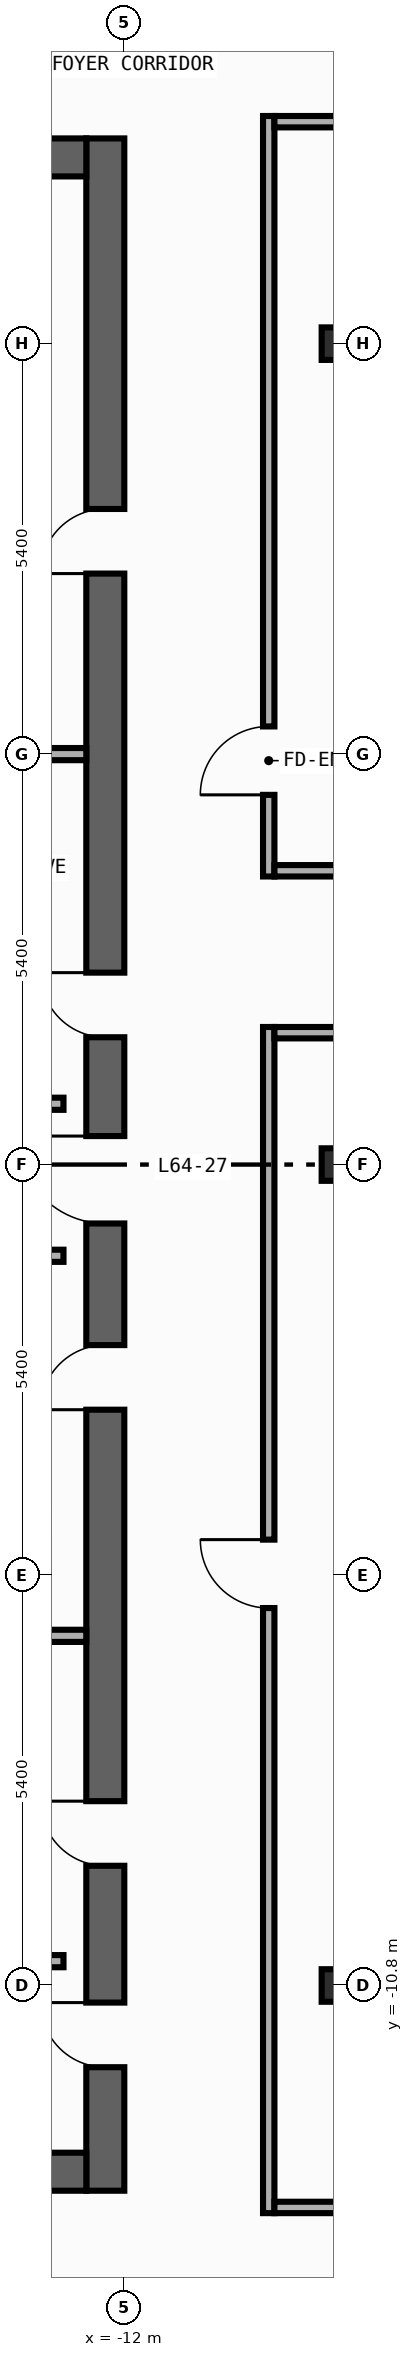
"""IFC4 building model, lengths in metres.
Left out: names, types, materials, properties, quantities, classifications, styles, units other than length and angle.
Written with IfcOpenShell. Run it as: python <this file> out.ifc"""

import sys

from ifc_helpers import new_model, si_unit, direction, frame, frame_2d, origin, origin_2d, place, context, subcontext, project, spatial, rectangle, i_section, extrude, element, fill, save


model = new_model("IFC4")
c1 = context("Model", 3, precision=1e-05, world=origin(), true_north=direction((0.0, 1.0)))
c2 = subcontext(c1, "Body", "Model", "MODEL_VIEW")
j1 = project(units=[si_unit("LENGTHUNIT", "METRE"), si_unit("PLANEANGLEUNIT", "RADIAN")], contexts=[c1])
p1 = place(None, origin())
s1 = spatial("IfcSite", under=j1, at=p1, CompositionType="ELEMENT")
p2 = place(p1, origin())
s2 = spatial("IfcBuilding", under=s1, at=p2, CompositionType="ELEMENT")
p3 = place(p2, frame((0.0, 0.0, 269.2)))
s3 = spatial("IfcBuildingStorey", under=s2, at=p3, CompositionType="ELEMENT", Elevation=269.2)
p4 = place(p3, frame((-12.25, -13.5, 0.0), z_axis=(0.0, 0.0, 1.0), x_axis=(0.0, 1.0, 0.0)))
e1 = element("IfcWall", 1, at=p4, inside=s3, PredefinedType="SHEAR", context=c2, shape_type="SweptSolid", body=[
    extrude(rectangle(XDim=27.0, YDim=0.5, at=frame_2d((13.5, 0.0))), origin(), (0.0, 0.0, 1.0), 3.25),
])
p5 = place(p4, frame((15.175, 0.0, 0.0)))
e2 = element("IfcOpeningElement", 2, at=p5, cuts=e1, PredefinedType="OPENING", context=c2, shape_type="SweptSolid", body=[
    extrude(rectangle(XDim=0.85, YDim=2.1, at=frame_2d((0.425, 1.05))), frame((0.0, 0.26, 0.0), z_axis=(0.0, -1.0, 0.0), x_axis=(1.0, 0.0, 0.0)), (0.0, 0.0, 1.0), 0.52),
])
p6 = place(p4, frame((21.275, 0.0, 0.0)))
e3 = element("IfcOpeningElement", 3, at=p6, cuts=e1, PredefinedType="OPENING", context=c2, shape_type="SweptSolid", body=[
    extrude(rectangle(XDim=0.85, YDim=2.1, at=frame_2d((0.425, 1.05))), frame((0.0, 0.26, 0.0), z_axis=(0.0, -1.0, 0.0), x_axis=(1.0, 0.0, 0.0)), (0.0, 0.0, 1.0), 0.52),
])
p7 = place(p4, frame((4.275, 0.0, 0.0)))
e4 = element("IfcOpeningElement", 4, at=p7, cuts=e1, PredefinedType="OPENING", context=c2, shape_type="SweptSolid", body=[
    extrude(rectangle(XDim=0.85, YDim=2.1, at=frame_2d((0.425, 1.05))), frame((0.0, 0.26, 0.0), z_axis=(0.0, -1.0, 0.0), x_axis=(1.0, 0.0, 0.0)), (0.0, 0.0, 1.0), 0.52),
])
p8 = place(p4, frame((10.275, 0.0, 0.0)))
e5 = element("IfcOpeningElement", 5, at=p8, cuts=e1, PredefinedType="OPENING", context=c2, shape_type="SweptSolid", body=[
    extrude(rectangle(XDim=0.85, YDim=2.1, at=frame_2d((0.425, 1.05))), frame((0.0, 0.26, 0.0), z_axis=(0.0, -1.0, 0.0), x_axis=(1.0, 0.0, 0.0)), (0.0, 0.0, 1.0), 0.52),
])
p9 = place(p4, frame((12.725, 0.0, 0.0)))
e6 = element("IfcOpeningElement", 6, at=p9, cuts=e1, PredefinedType="OPENING", context=c2, shape_type="SweptSolid", body=[
    extrude(rectangle(XDim=1.15, YDim=2.2, at=frame_2d((0.575, 1.1))), frame((0.0, 0.26, 0.0), z_axis=(0.0, -1.0, 0.0), x_axis=(1.0, 0.0, 0.0)), (0.0, 0.0, 1.0), 0.52),
])
p10 = place(p4, frame((1.625, 0.0, 0.0)))
e7 = element("IfcOpeningElement", 7, at=p10, cuts=e1, PredefinedType="OPENING", context=c2, shape_type="SweptSolid", body=[
    extrude(rectangle(XDim=0.85, YDim=2.1, at=frame_2d((0.425, 1.05))), frame((0.0, 0.26, 0.0), z_axis=(0.0, -1.0, 0.0), x_axis=(1.0, 0.0, 0.0)), (0.0, 0.0, 1.0), 0.52),
])
for number, where, z_axis, x_axis in (
    (8, (-19.9, -13.25, 0.0), (0.0, 0.0, 1.0), (1.0, 0.0, 0.0)),
    (9, (-19.9, 13.25, 0.0), (0.0, 0.0, 1.0), (1.0, 0.0, 0.0)),
):
    element("IfcWall", number, at=place(p3, frame(where, z_axis=z_axis, x_axis=x_axis)), inside=s3, PredefinedType="SHEAR", context=c2, shape_type="SweptSolid", body=[
        extrude(rectangle(XDim=7.4, YDim=0.5, at=frame_2d((3.7, 0.0))), origin(), (0.0, 0.0, 1.0), 3.25),
    ])
for number, where, z_axis, x_axis in (
    (10, (-9.2, -10.8, 0.0), (0.0, 0.0, 1.0), (1.0, 0.0, 0.0)),
    (11, (-9.2, 0.0, 0.0), (0.0, 0.0, 1.0), (1.0, 0.0, 0.0)),
    (12, (-9.2, 10.8, 0.0), (0.0, 0.0, 1.0), (1.0, 0.0, 0.0)),
):
    element("IfcColumn", number, at=place(p3, frame(where, z_axis=z_axis, x_axis=x_axis)), inside=s3, PredefinedType="COLUMN", context=c2, shape_type="SweptSolid", body=[
        extrude(i_section(OverallWidth=0.407, OverallDepth=0.428, WebThickness=0.02, FlangeThickness=0.035, FilletRadius=0.022, at=origin_2d()), origin(), (0.0, 0.0, 1.0), 3.6),
    ])
for number, where, z_axis, x_axis in (
    (13, (-15.4, 0.8, 0.0), (0.0, 0.0, 1.0), (1.0, 0.0, 0.0)),
    (14, (-15.4, -1.2, 0.0), (0.0, 0.0, 1.0), (1.0, 0.0, 0.0)),
    (15, (-15.4, -10.48, 0.0), (0.0, 0.0, 1.0), (1.0, 0.0, 0.0)),
):
    element("IfcWall", number, at=place(p3, frame(where, z_axis=z_axis, x_axis=x_axis)), inside=s3, PredefinedType="STANDARD", context=c2, shape_type="SweptSolid", body=[
        extrude(rectangle(XDim=2.6, YDim=0.16, at=frame_2d((1.3, 0.0))), origin(), (0.0, 0.0, 1.0), 3.25),
    ])
for number, where, z_axis, x_axis in (
    (16, (-15.4, 5.4, 0.0), (0.0, 0.0, 1.0), (1.0, 0.0, 0.0)),
    (17, (-15.4, -6.2, 0.0), (0.0, 0.0, 1.0), (1.0, 0.0, 0.0)),
):
    element("IfcWall", number, at=place(p3, frame(where, z_axis=z_axis, x_axis=x_axis)), inside=s3, PredefinedType="PARTITIONING", context=c2, shape_type="SweptSolid", body=[
        extrude(rectangle(XDim=2.9, YDim=0.16, at=frame_2d((1.45, 0.0))), origin(), (0.0, 0.0, 1.0), 3.25),
    ])
p11 = place(p3, frame((-10.1, 3.79, 0.0), z_axis=(0.0, 0.0, 1.0), x_axis=(0.0, 1.0, 0.0)))
e18 = element("IfcWall", 18, at=p11, inside=s3, PredefinedType="PARTITIONING", context=c2, shape_type="SweptSolid", body=[
    extrude(rectangle(XDim=10.005, YDim=0.15, at=frame_2d((5.002, 0.0))), origin(), (0.0, 0.0, 1.0), 3.25),
])
p12 = place(p11, frame((1.074, 0.0, 0.0)))
e19 = element("IfcOpeningElement", 19, at=p12, cuts=e18, PredefinedType="OPENING", context=c2, shape_type="SweptSolid", body=[
    extrude(rectangle(XDim=0.9, YDim=2.15, at=frame_2d((0.45, 1.075))), frame((0.0, 0.085, 0.0), z_axis=(0.0, -1.0, 0.0), x_axis=(1.0, 0.0, 0.0)), (0.0, 0.0, 1.0), 0.17),
])
p13 = place(p3, frame((-10.1, -13.795, 0.0), z_axis=(0.0, 0.0, 1.0), x_axis=(0.0, 1.0, 0.0)))
e20 = element("IfcWall", 20, at=p13, inside=s3, PredefinedType="PARTITIONING", context=c2, shape_type="SweptSolid", body=[
    extrude(rectangle(XDim=15.605, YDim=0.15, at=frame_2d((7.802, 0.0))), origin(), (0.0, 0.0, 1.0), 3.25),
])
p14 = place(p13, frame((7.961, 0.0, 0.0)))
e21 = element("IfcOpeningElement", 21, at=p14, cuts=e20, PredefinedType="OPENING", context=c2, shape_type="SweptSolid", body=[
    extrude(rectangle(XDim=0.9, YDim=2.15, at=frame_2d((0.45, 1.075))), frame((0.0, 0.085, 0.0), z_axis=(0.0, -1.0, 0.0), x_axis=(1.0, 0.0, 0.0)), (0.0, 0.0, 1.0), 0.17),
])
p15 = place(p3, frame((-10.025, 3.865, 0.0), z_axis=(0.0, 0.0, 1.0), x_axis=(1.0, 0.0, 0.0)))
e22 = element("IfcWall", 22, at=p15, inside=s3, PredefinedType="PARTITIONING", context=c2, shape_type="SweptSolid", body=[
    extrude(rectangle(XDim=12.055, YDim=0.15, at=frame_2d((6.027, 0.0))), origin(), (0.0, 0.0, 1.0), 3.25),
])
p16 = place(p15, frame((9.491, 0.0, 0.0)))
e23 = element("IfcOpeningElement", 23, at=p16, cuts=e22, PredefinedType="OPENING", context=c2, shape_type="SweptSolid", body=[
    extrude(rectangle(XDim=0.9, YDim=2.15, at=frame_2d((0.45, 1.075))), frame((0.0, 0.085, 0.0), z_axis=(0.0, -1.0, 0.0), x_axis=(1.0, 0.0, 0.0)), (0.0, 0.0, 1.0), 0.17),
])
p17 = place(p3, frame((-10.025, 1.735, 0.0), z_axis=(0.0, 0.0, 1.0), x_axis=(1.0, 0.0, 0.0)))
e24 = element("IfcWall", 24, at=p17, inside=s3, PredefinedType="PARTITIONING", context=c2, shape_type="SweptSolid", body=[
    extrude(rectangle(XDim=12.035, YDim=0.15, at=frame_2d((6.018, 0.0))), origin(), (0.0, 0.0, 1.0), 3.25),
])
p18 = place(p17, frame((9.674, 0.0, 0.0)))
e25 = element("IfcOpeningElement", 25, at=p18, cuts=e24, PredefinedType="OPENING", context=c2, shape_type="SweptSolid", body=[
    extrude(rectangle(XDim=0.9, YDim=2.15, at=frame_2d((0.45, 1.075))), frame((0.0, 0.085, 0.0), z_axis=(0.0, -1.0, 0.0), x_axis=(1.0, 0.0, 0.0)), (0.0, 0.0, 1.0), 0.17),
])
p19 = place(p3, frame((-10.025, 13.72, 0.0), z_axis=(0.0, 0.0, 1.0), x_axis=(1.0, 0.0, 0.0)))
e26 = element("IfcWall", 26, at=p19, inside=s3, PredefinedType="PARTITIONING", context=c2, shape_type="SweptSolid", body=[
    extrude(rectangle(XDim=12.055, YDim=0.15, at=frame_2d((6.027, 0.0))), origin(), (0.0, 0.0, 1.0), 3.25),
])
p20 = place(p19, frame((7.283, 0.0, 0.0)))
e27 = element("IfcOpeningElement", 27, at=p20, cuts=e26, PredefinedType="OPENING", context=c2, shape_type="SweptSolid", body=[
    extrude(rectangle(XDim=0.9, YDim=2.15, at=frame_2d((0.45, 1.075))), frame((0.0, 0.085, 0.0), z_axis=(0.0, -1.0, 0.0), x_axis=(1.0, 0.0, 0.0)), (0.0, 0.0, 1.0), 0.17),
])
p21 = place(p3, frame((-10.025, -13.72, 0.0), z_axis=(0.0, 0.0, 1.0), x_axis=(1.0, 0.0, 0.0)))
e28 = element("IfcWall", 28, at=p21, inside=s3, PredefinedType="PARTITIONING", context=c2, shape_type="SweptSolid", body=[
    extrude(rectangle(XDim=11.885, YDim=0.15, at=frame_2d((5.942, 0.0))), origin(), (0.0, 0.0, 1.0), 3.25),
])
p22 = place(p21, frame((7.304, 0.0, 0.0)))
e29 = element("IfcOpeningElement", 29, at=p22, cuts=e28, PredefinedType="OPENING", context=c2, shape_type="SweptSolid", body=[
    extrude(rectangle(XDim=0.9, YDim=2.15, at=frame_2d((0.45, 1.075))), frame((0.0, 0.085, 0.0), z_axis=(0.0, -1.0, 0.0), x_axis=(1.0, 0.0, 0.0)), (0.0, 0.0, 1.0), 0.17),
])
p23 = place(p5, origin())
e30 = element("IfcDoor", 30, at=p23, inside=s3, OperationType="SINGLE_SWING_RIGHT", PredefinedType="DOOR", context=c2, shape_type="SweptSolid", body=[
    extrude(rectangle(XDim=0.85, YDim=2.1, at=frame_2d((0.425, 1.05))), frame((0.0, 0.025, 0.0), z_axis=(0.0, -1.0, 0.0), x_axis=(1.0, 0.0, 0.0)), (0.0, 0.0, 1.0), 0.05),
])
fill(e2, e30)
p24 = place(p6, origin())
e31 = element("IfcDoor", 31, at=p24, inside=s3, OperationType="SINGLE_SWING_LEFT", PredefinedType="DOOR", context=c2, shape_type="SweptSolid", body=[
    extrude(rectangle(XDim=0.85, YDim=2.1, at=frame_2d((0.425, 1.05))), frame((0.0, 0.025, 0.0), z_axis=(0.0, -1.0, 0.0), x_axis=(1.0, 0.0, 0.0)), (0.0, 0.0, 1.0), 0.05),
])
fill(e3, e31)
p25 = place(p7, origin())
e32 = element("IfcDoor", 32, at=p25, inside=s3, OperationType="SINGLE_SWING_RIGHT", PredefinedType="DOOR", context=c2, shape_type="SweptSolid", body=[
    extrude(rectangle(XDim=0.85, YDim=2.1, at=frame_2d((0.425, 1.05))), frame((0.0, 0.025, 0.0), z_axis=(0.0, -1.0, 0.0), x_axis=(1.0, 0.0, 0.0)), (0.0, 0.0, 1.0), 0.05),
])
fill(e4, e32)
p26 = place(p8, origin())
e33 = element("IfcDoor", 33, at=p26, inside=s3, OperationType="SINGLE_SWING_LEFT", PredefinedType="DOOR", context=c2, shape_type="SweptSolid", body=[
    extrude(rectangle(XDim=0.85, YDim=2.1, at=frame_2d((0.425, 1.05))), frame((0.0, 0.025, 0.0), z_axis=(0.0, -1.0, 0.0), x_axis=(1.0, 0.0, 0.0)), (0.0, 0.0, 1.0), 0.05),
])
fill(e5, e33)
p27 = place(p9, origin())
e34 = element("IfcDoor", 34, at=p27, inside=s3, OperationType="SINGLE_SWING_RIGHT", PredefinedType="DOOR", context=c2, shape_type="SweptSolid", body=[
    extrude(rectangle(XDim=1.15, YDim=2.2, at=frame_2d((0.575, 1.1))), frame((0.0, 0.025, 0.0), z_axis=(0.0, -1.0, 0.0), x_axis=(1.0, 0.0, 0.0)), (0.0, 0.0, 1.0), 0.05),
])
fill(e6, e34)
p28 = place(p10, origin())
e35 = element("IfcDoor", 35, at=p28, inside=s3, OperationType="SINGLE_SWING_RIGHT", PredefinedType="DOOR", context=c2, shape_type="SweptSolid", body=[
    extrude(rectangle(XDim=0.85, YDim=2.1, at=frame_2d((0.425, 1.05))), frame((0.0, 0.025, 0.0), z_axis=(0.0, -1.0, 0.0), x_axis=(1.0, 0.0, 0.0)), (0.0, 0.0, 1.0), 0.05),
])
fill(e7, e35)
p29 = place(p12, origin())
e36 = element("IfcDoor", 36, at=p29, inside=s3, OperationType="SINGLE_SWING_LEFT", PredefinedType="DOOR", context=c2, shape_type="SweptSolid", body=[
    extrude(rectangle(XDim=0.9, YDim=2.15, at=frame_2d((0.45, 1.075))), frame((0.0, 0.025, 0.0), z_axis=(0.0, -1.0, 0.0), x_axis=(1.0, 0.0, 0.0)), (0.0, 0.0, 1.0), 0.05),
])
fill(e19, e36)
p30 = place(p14, origin())
e37 = element("IfcDoor", 37, at=p30, inside=s3, OperationType="SINGLE_SWING_RIGHT", PredefinedType="DOOR", context=c2, shape_type="SweptSolid", body=[
    extrude(rectangle(XDim=0.9, YDim=2.15, at=frame_2d((0.45, 1.075))), frame((0.0, 0.025, 0.0), z_axis=(0.0, -1.0, 0.0), x_axis=(1.0, 0.0, 0.0)), (0.0, 0.0, 1.0), 0.05),
])
fill(e21, e37)
save(model, sys.argv[1])
